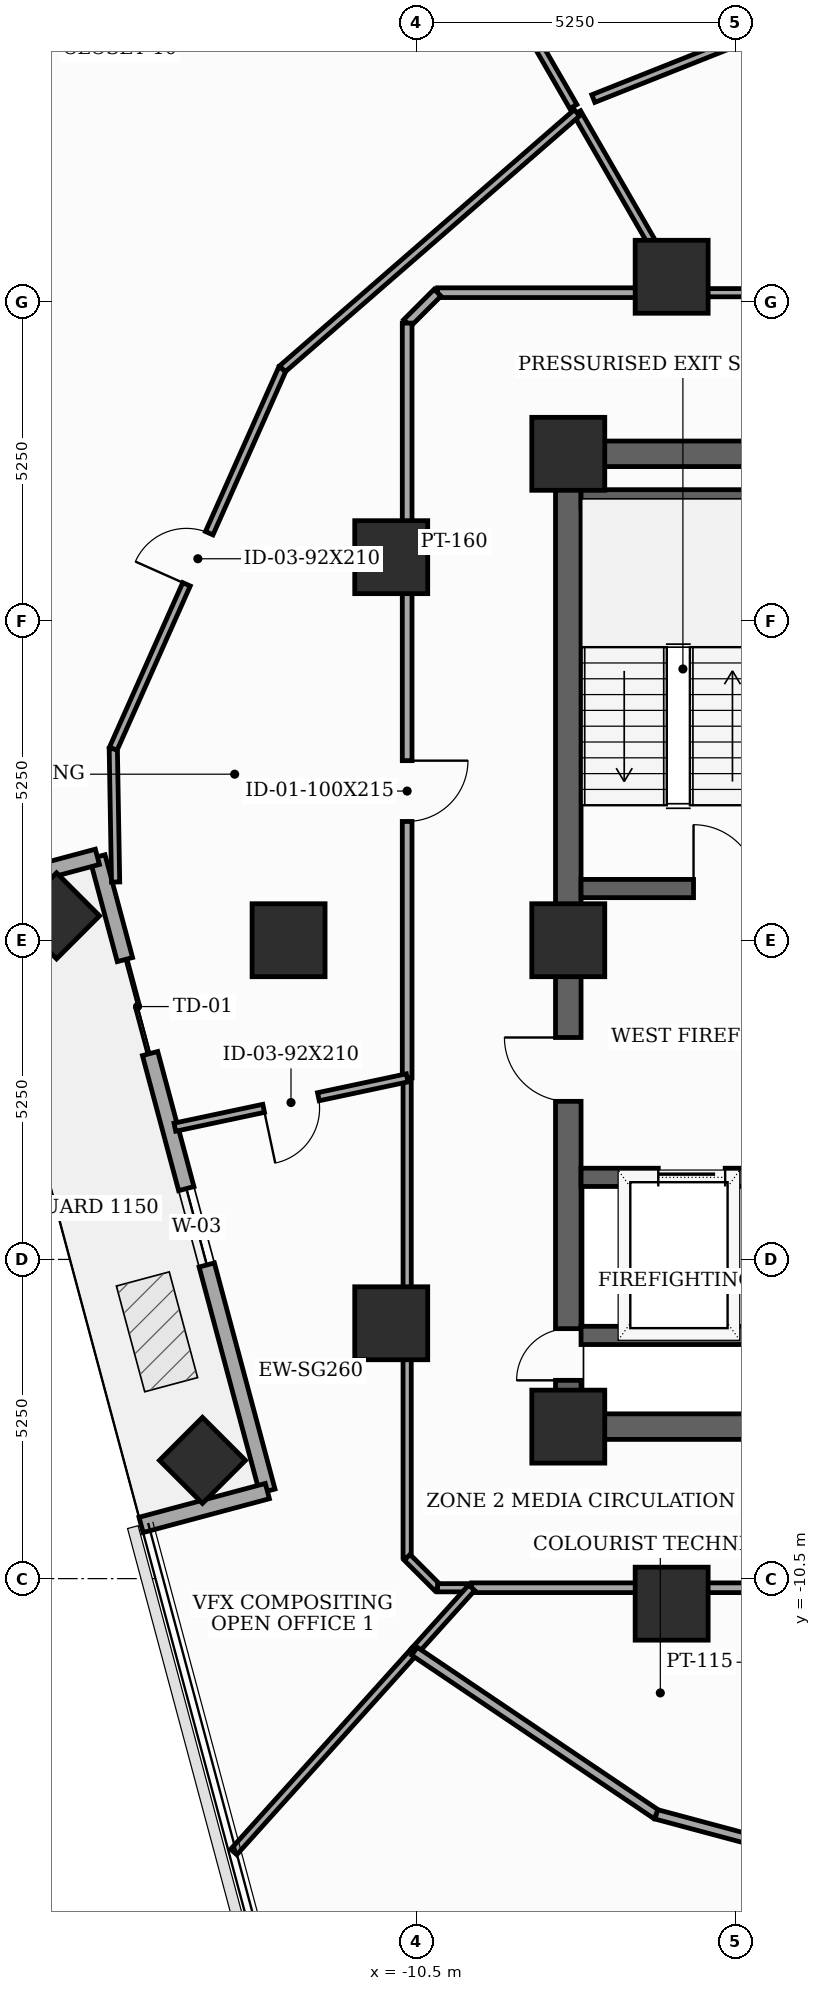
"""IFC4 building model, lengths in metres.
Left out: names, types, materials, properties, quantities, classifications, styles, units other than length and angle.
Written with IfcOpenShell. Run it as: python <this file> out.ifc"""

import sys

from ifc_helpers import new_model, si_unit, direction, frame, frame_2d, origin, origin_2d, place, context, subcontext, project, spatial, rectangle, extrude, element, fill, save


model = new_model("IFC4")
c1 = context("Model", 3, precision=1e-05, world=origin(), true_north=direction((0.0, 1.0)))
c2 = subcontext(c1, "Body", "Model", "MODEL_VIEW")
j1 = project(units=[si_unit("LENGTHUNIT", "METRE"), si_unit("PLANEANGLEUNIT", "RADIAN")], contexts=[c1])
p1 = place(None, origin())
s1 = spatial("IfcSite", under=j1, at=p1, CompositionType="ELEMENT")
p2 = place(p1, origin())
s2 = spatial("IfcBuilding", under=s1, at=p2, CompositionType="ELEMENT")
p3 = place(p2, frame((0.0, 0.0, 206.4)))
s3 = spatial("IfcBuildingStorey", under=s2, at=p3, CompositionType="ELEMENT", Elevation=206.4)
for number, where, z_axis, x_axis in (
    (1, (-8.0, -8.0, 0.0), (0.0, 0.0, 1.0), (1.0, 0.0, 0.0)),
    (2, (-8.0, 8.0, 0.0), (0.0, 0.0, 1.0), (1.0, 0.0, 0.0)),
    (3, (-8.0, 0.0, 0.0), (0.0, 0.0, 1.0), (1.0, 0.0, 0.0)),
    (4, (-6.3, 10.912, 0.0), (0.0, 0.0, 1.0), (1.0, 0.0, 0.0)),
    (5, (-10.912, 6.3, 0.0), (0.0, 0.0, 1.0), (1.0, 0.0, 0.0)),
    (6, (-12.6, 0.0, 0.0), (0.0, 0.0, 1.0), (1.0, 0.0, 0.0)),
    (7, (-10.912, -6.3, 0.0), (0.0, 0.0, 1.0), (1.0, 0.0, 0.0)),
    (8, (-6.3, -10.912, 0.0), (0.0, 0.0, 1.0), (1.0, 0.0, 0.0)),
):
    element("IfcColumn", number, at=place(p3, frame(where, z_axis=z_axis, x_axis=x_axis)), inside=s3, PredefinedType="COLUMN", context=c2, shape_type="SweptSolid", body=[
        extrude(rectangle(XDim=1.2, YDim=1.2, at=origin_2d()), origin(), (0.0, 0.0, 1.0), 3.7),
    ])
for number, where, z_axis, x_axis in (
    (9, (-16.416, 0.401, 0.0), (0.0, 0.0, 1.0), (0.707, 0.707, 0.0)),
    (10, (-14.016, -8.555, 0.0), (0.0, 0.0, 1.0), (0.707, 0.707, 0.0)),
):
    element("IfcColumn", number, at=place(p3, frame(where, z_axis=z_axis, x_axis=x_axis)), inside=s3, PredefinedType="COLUMN", context=c2, shape_type="SweptSolid", body=[
        extrude(rectangle(XDim=1.0, YDim=1.0, at=origin_2d()), origin(), (0.0, 0.0, 1.0), 3.7),
    ])
p4 = place(p3, frame((-15.744, 1.372, 0.0), z_axis=(0.0, 0.0, 1.0), x_axis=(0.25880915351, -0.965928476679, 0.0)))
e11 = element("IfcWall", 11, at=p4, inside=s3, PredefinedType="SOLIDWALL", context=c2, shape_type="SweptSolid", body=[
    extrude(rectangle(XDim=10.8, YDim=0.26, at=frame_2d((5.4, 0.0))), origin(), (0.0, 0.0, 1.0), 3.5),
])
p5 = place(p4, frame((1.75, 0.0, 0.0)))
e12 = element("IfcOpeningElement", 12, at=p5, cuts=e11, PredefinedType="OPENING", context=c2, shape_type="SweptSolid", body=[
    extrude(rectangle(XDim=1.6, YDim=2.08, at=frame_2d((0.8, 1.04))), frame((0.0, 0.14, 0.0), z_axis=(0.0, -1.0, 0.0), x_axis=(1.0, 0.0, 0.0)), (0.0, 0.0, 1.0), 0.28),
])
p6 = place(p4, frame((5.65, 0.0, 0.85)))
e13 = element("IfcOpeningElement", 13, at=p6, cuts=e11, PredefinedType="OPENING", context=c2, shape_type="SweptSolid", body=[
    extrude(rectangle(XDim=1.3, YDim=1.25, at=frame_2d((0.65, 0.625))), frame((0.0, 0.14, 0.0), z_axis=(0.0, -1.0, 0.0), x_axis=(1.0, 0.0, 0.0)), (0.0, 0.0, 1.0), 0.28),
])
p7 = place(p3, frame((-17.821, 0.815, 0.0), z_axis=(0.0, 0.0, 1.0), x_axis=(0.965910035775, 0.258877968916, 0.0)))
e14 = element("IfcWall", 14, at=p7, inside=s3, PredefinedType="SOLIDWALL", context=c2, shape_type="SweptSolid", body=[
    extrude(rectangle(XDim=2.15, YDim=0.26, at=frame_2d((1.075, 0.0))), origin(), (0.0, 0.0, 1.0), 3.5),
])
p8 = place(p3, frame((-12.949, -9.06, 0.0), z_axis=(0.0, 0.0, 1.0), x_axis=(-0.965930817892, -0.258800415469, 0.0)))
e15 = element("IfcWall", 15, at=p8, inside=s3, PredefinedType="SOLIDWALL", context=c2, shape_type="SweptSolid", body=[
    extrude(rectangle(XDim=2.15, YDim=0.26, at=frame_2d((1.075, 0.0))), origin(), (0.0, 0.0, 1.0), 3.5),
])
p9 = place(p3, frame((-8.0, -8.0, 0.0), z_axis=(0.0, 0.0, 1.0), x_axis=(0.0, 1.0, 0.0)))
e16 = element("IfcWall", 16, at=p9, inside=s3, PredefinedType="SHEAR", context=c2, shape_type="SweptSolid", body=[
    extrude(rectangle(XDim=16.0, YDim=0.42, at=frame_2d((8.0, 0.0))), origin(), (0.0, 0.0, 1.0), 3.5),
])
p10 = place(p9, frame((0.761, 0.0, 0.0)))
e17 = element("IfcOpeningElement", 17, at=p10, cuts=e16, PredefinedType="OPENING", context=c2, shape_type="SweptSolid", body=[
    extrude(rectangle(XDim=0.85, YDim=2.02, at=frame_2d((0.425, 1.01))), frame((0.0, 0.22, 0.0), z_axis=(0.0, -1.0, 0.0), x_axis=(1.0, 0.0, 0.0)), (0.0, 0.0, 1.0), 0.44),
])
p11 = place(p9, frame((5.35, 0.0, 0.0)))
e18 = element("IfcOpeningElement", 18, at=p11, cuts=e16, PredefinedType="OPENING", context=c2, shape_type="SweptSolid", body=[
    extrude(rectangle(XDim=1.05, YDim=2.15, at=frame_2d((0.525, 1.075))), frame((0.0, 0.22, 0.0), z_axis=(0.0, -1.0, 0.0), x_axis=(1.0, 0.0, 0.0)), (0.0, 0.0, 1.0), 0.44),
])
p12 = place(p3, frame((-8.0, -8.0, 0.0), z_axis=(0.0, 0.0, 1.0), x_axis=(1.0, 0.0, 0.0)))
e19 = element("IfcWall", 19, at=p12, inside=s3, PredefinedType="SHEAR", context=c2, shape_type="SweptSolid", body=[
    extrude(rectangle(XDim=16.0, YDim=0.42, at=frame_2d((8.0, 0.0))), origin(), (0.0, 0.0, 1.0), 3.5),
])
p13 = place(p12, frame((4.35, 0.0, 0.0)))
e20 = element("IfcOpeningElement", 20, at=p13, cuts=e19, PredefinedType="OPENING", context=c2, shape_type="SweptSolid", body=[
    extrude(rectangle(XDim=0.85, YDim=2.02, at=frame_2d((0.425, 1.01))), frame((0.0, 0.22, 0.0), z_axis=(0.0, -1.0, 0.0), x_axis=(1.0, 0.0, 0.0)), (0.0, 0.0, 1.0), 0.44),
])
p14 = place(p12, frame((6.49, 0.0, 0.0)))
e21 = element("IfcOpeningElement", 21, at=p14, cuts=e19, PredefinedType="OPENING", context=c2, shape_type="SweptSolid", body=[
    extrude(rectangle(XDim=0.85, YDim=2.02, at=frame_2d((0.425, 1.01))), frame((0.0, 0.22, 0.0), z_axis=(0.0, -1.0, 0.0), x_axis=(1.0, 0.0, 0.0)), (0.0, 0.0, 1.0), 0.44),
])
p15 = place(p12, frame((8.69, 0.0, 0.0)))
e22 = element("IfcOpeningElement", 22, at=p15, cuts=e19, PredefinedType="OPENING", context=c2, shape_type="SweptSolid", body=[
    extrude(rectangle(XDim=0.85, YDim=2.02, at=frame_2d((0.425, 1.01))), frame((0.0, 0.22, 0.0), z_axis=(0.0, -1.0, 0.0), x_axis=(1.0, 0.0, 0.0)), (0.0, 0.0, 1.0), 0.44),
])
p16 = place(p12, frame((10.8, 0.0, 0.0)))
e23 = element("IfcOpeningElement", 23, at=p16, cuts=e19, PredefinedType="OPENING", context=c2, shape_type="SweptSolid", body=[
    extrude(rectangle(XDim=0.85, YDim=2.02, at=frame_2d((0.425, 1.01))), frame((0.0, 0.22, 0.0), z_axis=(0.0, -1.0, 0.0), x_axis=(1.0, 0.0, 0.0)), (0.0, 0.0, 1.0), 0.44),
])
p17 = place(p3, frame((-8.0, 8.0, 0.0), z_axis=(0.0, 0.0, 1.0), x_axis=(1.0, 0.0, 0.0)))
e24 = element("IfcWall", 24, at=p17, inside=s3, PredefinedType="SHEAR", context=c2, shape_type="SweptSolid", body=[
    extrude(rectangle(XDim=16.0, YDim=0.42, at=frame_2d((8.0, 0.0))), origin(), (0.0, 0.0, 1.0), 3.5),
])
p18 = place(p17, frame((7.1, 0.0, 0.0)))
e25 = element("IfcOpeningElement", 25, at=p18, cuts=e24, PredefinedType="OPENING", context=c2, shape_type="SweptSolid", body=[
    extrude(rectangle(XDim=1.8, YDim=2.15, at=frame_2d((0.9, 1.075))), frame((0.0, 0.22, 0.0), z_axis=(0.0, -1.0, 0.0), x_axis=(1.0, 0.0, 0.0)), (0.0, 0.0, 1.0), 0.44),
])
p19 = place(p3, frame((-7.79, 0.85, 0.0), z_axis=(0.0, 0.0, 1.0), x_axis=(1.0, 0.0, 0.0)))
e26 = element("IfcWall", 26, at=p19, inside=s3, PredefinedType="SHEAR", context=c2, shape_type="SweptSolid", body=[
    extrude(rectangle(XDim=3.34, YDim=0.3, at=frame_2d((1.67, 0.0))), origin(), (0.0, 0.0, 1.0), 3.5),
])
p20 = place(p19, frame((1.85, 0.0, 0.0)))
e27 = element("IfcOpeningElement", 27, at=p20, cuts=e26, PredefinedType="OPENING", context=c2, shape_type="SweptSolid", body=[
    extrude(rectangle(XDim=1.05, YDim=2.15, at=frame_2d((0.525, 1.075))), frame((0.0, 0.16, 0.0), z_axis=(0.0, -1.0, 0.0), x_axis=(1.0, 0.0, 0.0)), (0.0, 0.0, 1.0), 0.32),
])
p21 = place(p3, frame((-7.79, 7.26, 0.0), z_axis=(0.0, 0.0, 1.0), x_axis=(1.0, 0.0, 0.0)))
e28 = element("IfcWall", 28, at=p21, inside=s3, PredefinedType="SHEAR", context=c2, shape_type="SweptSolid", body=[
    extrude(rectangle(XDim=3.34, YDim=0.3, at=frame_2d((1.67, 0.0))), origin(), (0.0, 0.0, 1.0), 3.5),
])
p22 = place(p3, frame((-7.79, -3.9, 0.0), z_axis=(0.0, 0.0, 1.0), x_axis=(1.0, 0.0, 0.0)))
e29 = element("IfcWall", 29, at=p22, inside=s3, PredefinedType="SHEAR", context=c2, shape_type="SweptSolid", body=[
    extrude(rectangle(XDim=3.34, YDim=0.3, at=frame_2d((1.67, 0.0))), origin(), (0.0, 0.0, 1.0), 3.5),
])
p23 = place(p22, frame((1.27, 0.0, 0.0)))
e30 = element("IfcOpeningElement", 30, at=p23, cuts=e29, PredefinedType="OPENING", context=c2, shape_type="SweptSolid", body=[
    extrude(rectangle(XDim=1.1, YDim=2.1, at=frame_2d((0.55, 1.05))), frame((0.0, 0.16, 0.0), z_axis=(0.0, -1.0, 0.0), x_axis=(1.0, 0.0, 0.0)), (0.0, 0.0, 1.0), 0.32),
])
p24 = place(p3, frame((-7.79, -6.5, 0.0), z_axis=(0.0, 0.0, 1.0), x_axis=(1.0, 0.0, 0.0)))
e31 = element("IfcWall", 31, at=p24, inside=s3, PredefinedType="SHEAR", context=c2, shape_type="SweptSolid", body=[
    extrude(rectangle(XDim=3.34, YDim=0.3, at=frame_2d((1.67, 0.0))), origin(), (0.0, 0.0, 1.0), 3.5),
])
p25 = place(p3, frame((-10.65, -2.264, 0.0), z_axis=(0.0, 0.0, 1.0), x_axis=(0.0, -1.0, 0.0)))
e32 = element("IfcWall", 32, at=p25, inside=s3, PredefinedType="PARTITIONING", context=c2, shape_type="SweptSolid", body=[
    extrude(rectangle(XDim=7.886, YDim=0.135, at=frame_2d((3.943, 0.0))), origin(), (0.0, 0.0, 1.0), 2.885),
])
p26 = place(p3, frame((-10.65, -10.15, 0.0), z_axis=(0.0, 0.0, 1.0), x_axis=(0.707106781187, -0.707106781187, 0.0)))
e33 = element("IfcWall", 33, at=p26, inside=s3, PredefinedType="PARTITIONING", context=c2, shape_type="SweptSolid", body=[
    extrude(rectangle(XDim=0.707, YDim=0.135, at=frame_2d((0.354, 0.0))), origin(), (0.0, 0.0, 1.0), 3.5),
])
p27 = place(p3, frame((-10.15, -10.65, 0.0), z_axis=(0.0, 0.0, 1.0), x_axis=(1.0, 0.0, 0.0)))
e34 = element("IfcWall", 34, at=p27, inside=s3, PredefinedType="PARTITIONING", context=c2, shape_type="SweptSolid", body=[
    extrude(rectangle(XDim=0.561, YDim=0.135, at=frame_2d((0.28, 0.0))), origin(), (0.0, 0.0, 1.0), 3.5),
])
p28 = place(p3, frame((-9.589, -10.65, 0.0), z_axis=(0.0, 0.0, 1.0), x_axis=(1.0, 0.0, 0.0)))
e35 = element("IfcWall", 35, at=p28, inside=s3, PredefinedType="PARTITIONING", context=c2, shape_type="SweptSolid", body=[
    extrude(rectangle(XDim=4.739, YDim=0.16, at=frame_2d((2.37, 0.0))), origin(), (0.0, 0.0, 1.0), 2.885),
])
p29 = place(p3, frame((5.194, 10.65, 0.0), z_axis=(0.0, 0.0, 1.0), x_axis=(-1.0, 0.0, 0.0)))
e36 = element("IfcWall", 36, at=p29, inside=s3, PredefinedType="PARTITIONING", context=c2, shape_type="SweptSolid", body=[
    extrude(rectangle(XDim=11.343, YDim=0.135, at=frame_2d((5.671, 0.0))), origin(), (0.0, 0.0, 1.0), 2.885),
])
p30 = place(p29, frame((6.558, 0.0, 0.0)))
e37 = element("IfcOpeningElement", 37, at=p30, cuts=e36, PredefinedType="OPENING", context=c2, shape_type="SweptSolid", body=[
    extrude(rectangle(XDim=0.95, YDim=2.1, at=frame_2d((0.475, 1.05))), frame((0.0, 0.077, 0.0), z_axis=(0.0, -1.0, 0.0), x_axis=(1.0, 0.0, 0.0)), (0.0, 0.0, 1.0), 0.155),
])
p31 = place(p3, frame((-6.149, 10.65, 0.0), z_axis=(0.0, 0.0, 1.0), x_axis=(-1.0, 0.0, 0.0)))
e38 = element("IfcWall", 38, at=p31, inside=s3, PredefinedType="PARTITIONING", context=c2, shape_type="SweptSolid", body=[
    extrude(rectangle(XDim=4.001, YDim=0.16, at=frame_2d((2.0, 0.0))), origin(), (0.0, 0.0, 1.0), 2.885),
])
p32 = place(p3, frame((-10.15, 10.65, 0.0), z_axis=(0.0, 0.0, 1.0), x_axis=(-0.707106781187, -0.707106781187, 0.0)))
e39 = element("IfcWall", 39, at=p32, inside=s3, PredefinedType="PARTITIONING", context=c2, shape_type="SweptSolid", body=[
    extrude(rectangle(XDim=0.707, YDim=0.16, at=frame_2d((0.354, 0.0))), origin(), (0.0, 0.0, 1.0), 3.5),
])
p33 = place(p3, frame((-10.65, 10.15, 0.0), z_axis=(0.0, 0.0, 1.0), x_axis=(0.0, -1.0, 0.0)))
e40 = element("IfcWall", 40, at=p33, inside=s3, PredefinedType="PARTITIONING", context=c2, shape_type="SweptSolid", body=[
    extrude(rectangle(XDim=12.414, YDim=0.16, at=frame_2d((6.207, 0.0))), origin(), (0.0, 0.0, 1.0), 2.885),
])
p34 = place(p33, frame((7.197, 0.0, 0.0)))
e41 = element("IfcOpeningElement", 41, at=p34, cuts=e40, PredefinedType="OPENING", context=c2, shape_type="SweptSolid", body=[
    extrude(rectangle(XDim=1.0, YDim=2.15, at=frame_2d((0.5, 1.075))), frame((0.0, 0.09, 0.0), z_axis=(0.0, -1.0, 0.0), x_axis=(1.0, 0.0, 0.0)), (0.0, 0.0, 1.0), 0.18),
])
p35 = place(p3, frame((-10.53, -11.694, 0.0), z_axis=(0.0, 0.0, 1.0), x_axis=(0.669415636384, 0.74288808428, 0.0)))
e42 = element("IfcWall", 42, at=p35, inside=s3, PredefinedType="PARTITIONING", context=c2, shape_type="SweptSolid", body=[
    extrude(rectangle(XDim=1.406, YDim=0.135, at=frame_2d((0.703, 0.0))), origin(), (0.0, 0.0, 1.0), 3.5),
])
p36 = place(p3, frame((-13.502, -14.996, 0.0), z_axis=(0.0, 0.0, 1.0), x_axis=(0.669034568021, 0.74323128755, 0.0)))
e43 = element("IfcWall", 43, at=p36, inside=s3, PredefinedType="PARTITIONING", context=c2, shape_type="SweptSolid", body=[
    extrude(rectangle(XDim=4.442, YDim=0.135, at=frame_2d((2.221, 0.0))), origin(), (0.0, 0.0, 1.0), 2.985),
])
p37 = place(p3, frame((-10.65, -2.264, 0.0), z_axis=(0.0, 0.0, 1.0), x_axis=(-0.978186803753, -0.207727169534, 0.0)))
e44 = element("IfcWall", 44, at=p37, inside=s3, PredefinedType="PARTITIONING", context=c2, shape_type="SweptSolid", body=[
    extrude(rectangle(XDim=3.906, YDim=0.135, at=frame_2d((1.953, 0.0))), origin(), (0.0, 0.0, 1.0), 2.885),
])
p38 = place(p37, frame((1.493, 0.0, 0.0)))
e45 = element("IfcOpeningElement", 45, at=p38, cuts=e44, PredefinedType="OPENING", context=c2, shape_type="SweptSolid", body=[
    extrude(rectangle(XDim=0.92, YDim=2.1, at=frame_2d((0.46, 1.05))), frame((0.0, 0.077, 0.0), z_axis=(0.0, -1.0, 0.0), x_axis=(1.0, 0.0, 0.0)), (0.0, 0.0, 1.0), 0.155),
])
p39 = place(p3, frame((-10.53, -11.694, 0.0), z_axis=(0.0, 0.0, 1.0), x_axis=(0.829071580283, -0.559142481633, 0.0)))
e46 = element("IfcWall", 46, at=p39, inside=s3, PredefinedType="PARTITIONING", context=c2, shape_type="SweptSolid", body=[
    extrude(rectangle(XDim=4.798, YDim=0.16, at=frame_2d((2.399, 0.0))), origin(), (0.0, 0.0, 1.0), 2.985),
])
p40 = place(p3, frame((-6.552, -14.377, 0.0), z_axis=(0.0, 0.0, 1.0), x_axis=(0.965918799372, -0.258845268489, 0.0)))
e47 = element("IfcWall", 47, at=p40, inside=s3, PredefinedType="PARTITIONING", context=c2, shape_type="SweptSolid", body=[
    extrude(rectangle(XDim=5.216, YDim=0.16, at=frame_2d((2.608, 0.0))), origin(), (0.0, 0.0, 1.0), 3.5),
])
p41 = place(p3, frame((-3.261, 15.562, 0.0), z_axis=(0.0, 0.0, 1.0), x_axis=(-0.929345677851, -0.369210794885, 0.0)))
e48 = element("IfcWall", 48, at=p41, inside=s3, PredefinedType="PARTITIONING", context=c2, shape_type="SweptSolid", body=[
    extrude(rectangle(XDim=4.656, YDim=0.135, at=frame_2d((2.328, 0.0))), origin(), (0.0, 0.0, 1.0), 2.985),
])
p42 = place(p3, frame((-7.857, 13.609, 0.0), z_axis=(0.0, 0.0, 1.0), x_axis=(0.499920397431, -0.866071357471, 0.0)))
e49 = element("IfcWall", 49, at=p42, inside=s3, PredefinedType="PARTITIONING", context=c2, shape_type="SweptSolid", body=[
    extrude(rectangle(XDim=3.417, YDim=0.135, at=frame_2d((1.708, 0.0))), origin(), (0.0, 0.0, 1.0), 2.885),
])
p43 = place(p3, frame((-11.967, 20.726, 0.0), z_axis=(0.0, 0.0, 1.0), x_axis=(0.499980770555, -0.866036505625, 0.0)))
e50 = element("IfcWall", 50, at=p43, inside=s3, PredefinedType="PARTITIONING", context=c2, shape_type="SweptSolid", body=[
    extrude(rectangle(XDim=8.099, YDim=0.135, at=frame_2d((4.05, 0.0))), origin(), (0.0, 0.0, 1.0), 2.985),
])
p44 = place(p3, frame((-15.445, 0.958, 0.0), z_axis=(0.0, 0.0, 1.0), x_axis=(-0.017480624805, 0.999847202205, 0.0)))
e51 = element("IfcWall", 51, at=p44, inside=s3, PredefinedType="PARTITIONING", context=c2, shape_type="SweptSolid", body=[
    extrude(rectangle(XDim=2.193, YDim=0.135, at=frame_2d((1.096, 0.0))), origin(), (0.0, 0.0, 1.0), 3.5),
])
p45 = place(p3, frame((-15.483, 3.15, 0.0), z_axis=(0.0, 0.0, 1.0), x_axis=(0.406757719511, 0.913536073518, 0.0)))
e52 = element("IfcWall", 52, at=p45, inside=s3, PredefinedType="PARTITIONING", context=c2, shape_type="SweptSolid", body=[
    extrude(rectangle(XDim=6.839, YDim=0.135, at=frame_2d((3.42, 0.0))), origin(), (0.0, 0.0, 1.0), 2.985),
])
p46 = place(p45, frame((2.96, 0.0, 0.0)))
e53 = element("IfcOpeningElement", 53, at=p46, cuts=e52, PredefinedType="OPENING", context=c2, shape_type="SweptSolid", body=[
    extrude(rectangle(XDim=0.92, YDim=2.1, at=frame_2d((0.46, 1.05))), frame((0.0, 0.077, 0.0), z_axis=(0.0, -1.0, 0.0), x_axis=(1.0, 0.0, 0.0)), (0.0, 0.0, 1.0), 0.155),
])
p47 = place(p3, frame((-12.701, 9.398, 0.0), z_axis=(0.0, 0.0, 1.0), x_axis=(0.754700505452, 0.656069468174, 0.0)))
e54 = element("IfcWall", 54, at=p47, inside=s3, PredefinedType="PARTITIONING", context=c2, shape_type="SweptSolid", body=[
    extrude(rectangle(XDim=6.418, YDim=0.135, at=frame_2d((3.209, 0.0))), origin(), (0.0, 0.0, 1.0), 3.5),
])
p48 = place(p5, frame((1.6, 0.0, 0.0), z_axis=(0.0, 0.0, 1.0), x_axis=(-1.0, 0.0, 0.0)))
e55 = element("IfcDoor", 55, at=p48, inside=s3, OperationType="DOUBLE_DOOR_SLIDING", PredefinedType="DOOR", context=c2, shape_type="SweptSolid", body=[
    extrude(rectangle(XDim=1.6, YDim=2.08, at=frame_2d((0.8, 1.04))), frame((0.0, 0.025, 0.0), z_axis=(0.0, -1.0, 0.0), x_axis=(1.0, 0.0, 0.0)), (0.0, 0.0, 1.0), 0.05),
])
fill(e12, e55)
p49 = place(p6, origin())
e56 = element("IfcWindow", 56, at=p49, inside=s3, PartitioningType="SINGLE_PANEL", PredefinedType="WINDOW", context=c2, shape_type="SweptSolid", body=[
    extrude(rectangle(XDim=1.3, YDim=1.25, at=frame_2d((0.65, 0.625))), frame((0.0, 0.03, 0.0), z_axis=(0.0, -1.0, 0.0), x_axis=(1.0, 0.0, 0.0)), (0.0, 0.0, 1.0), 0.06),
])
fill(e13, e56)
p50 = place(p10, origin())
e57 = element("IfcDoor", 57, at=p50, inside=s3, OperationType="SINGLE_SWING_LEFT", PredefinedType="TRAPDOOR", context=c2, shape_type="SweptSolid", body=[
    extrude(rectangle(XDim=0.85, YDim=2.02, at=frame_2d((0.425, 1.01))), frame((0.0, 0.025, 0.0), z_axis=(0.0, -1.0, 0.0), x_axis=(1.0, 0.0, 0.0)), (0.0, 0.0, 1.0), 0.05),
])
fill(e17, e57)
p51 = place(p11, origin())
e58 = element("IfcDoor", 58, at=p51, inside=s3, OperationType="SINGLE_SWING_RIGHT", PredefinedType="DOOR", context=c2, shape_type="SweptSolid", body=[
    extrude(rectangle(XDim=1.05, YDim=2.15, at=frame_2d((0.525, 1.075))), frame((0.0, 0.025, 0.0), z_axis=(0.0, -1.0, 0.0), x_axis=(1.0, 0.0, 0.0)), (0.0, 0.0, 1.0), 0.05),
])
fill(e18, e58)
p52 = place(p20, origin())
e59 = element("IfcDoor", 59, at=p52, inside=s3, OperationType="SINGLE_SWING_LEFT", PredefinedType="DOOR", context=c2, shape_type="SweptSolid", body=[
    extrude(rectangle(XDim=1.05, YDim=2.15, at=frame_2d((0.525, 1.075))), frame((0.0, 0.025, 0.0), z_axis=(0.0, -1.0, 0.0), x_axis=(1.0, 0.0, 0.0)), (0.0, 0.0, 1.0), 0.05),
])
fill(e27, e59)
p53 = place(p23, origin())
e60 = element("IfcDoor", 60, at=p53, inside=s3, OperationType="SLIDING_TO_LEFT", PredefinedType="DOOR", context=c2, shape_type="SweptSolid", body=[
    extrude(rectangle(XDim=1.1, YDim=2.1, at=frame_2d((0.55, 1.05))), frame((0.0, 0.025, 0.0), z_axis=(0.0, -1.0, 0.0), x_axis=(1.0, 0.0, 0.0)), (0.0, 0.0, 1.0), 0.05),
])
fill(e30, e60)
p54 = place(p34, origin())
e61 = element("IfcDoor", 61, at=p54, inside=s3, OperationType="SINGLE_SWING_LEFT", PredefinedType="DOOR", context=c2, shape_type="SweptSolid", body=[
    extrude(rectangle(XDim=1.0, YDim=2.15, at=frame_2d((0.5, 1.075))), frame((0.0, 0.025, 0.0), z_axis=(0.0, -1.0, 0.0), x_axis=(1.0, 0.0, 0.0)), (0.0, 0.0, 1.0), 0.05),
])
fill(e41, e61)
p55 = place(p38, origin())
e62 = element("IfcDoor", 62, at=p55, inside=s3, OperationType="SINGLE_SWING_RIGHT", PredefinedType="DOOR", context=c2, shape_type="SweptSolid", body=[
    extrude(rectangle(XDim=0.92, YDim=2.1, at=frame_2d((0.46, 1.05))), frame((0.0, 0.025, 0.0), z_axis=(0.0, -1.0, 0.0), x_axis=(1.0, 0.0, 0.0)), (0.0, 0.0, 1.0), 0.05),
])
fill(e45, e62)
p56 = place(p46, origin())
e63 = element("IfcDoor", 63, at=p56, inside=s3, OperationType="SINGLE_SWING_LEFT", PredefinedType="DOOR", context=c2, shape_type="SweptSolid", body=[
    extrude(rectangle(XDim=0.92, YDim=2.1, at=frame_2d((0.46, 1.05))), frame((0.0, 0.025, 0.0), z_axis=(0.0, -1.0, 0.0), x_axis=(1.0, 0.0, 0.0)), (0.0, 0.0, 1.0), 0.05),
])
fill(e53, e63)
save(model, sys.argv[1])
